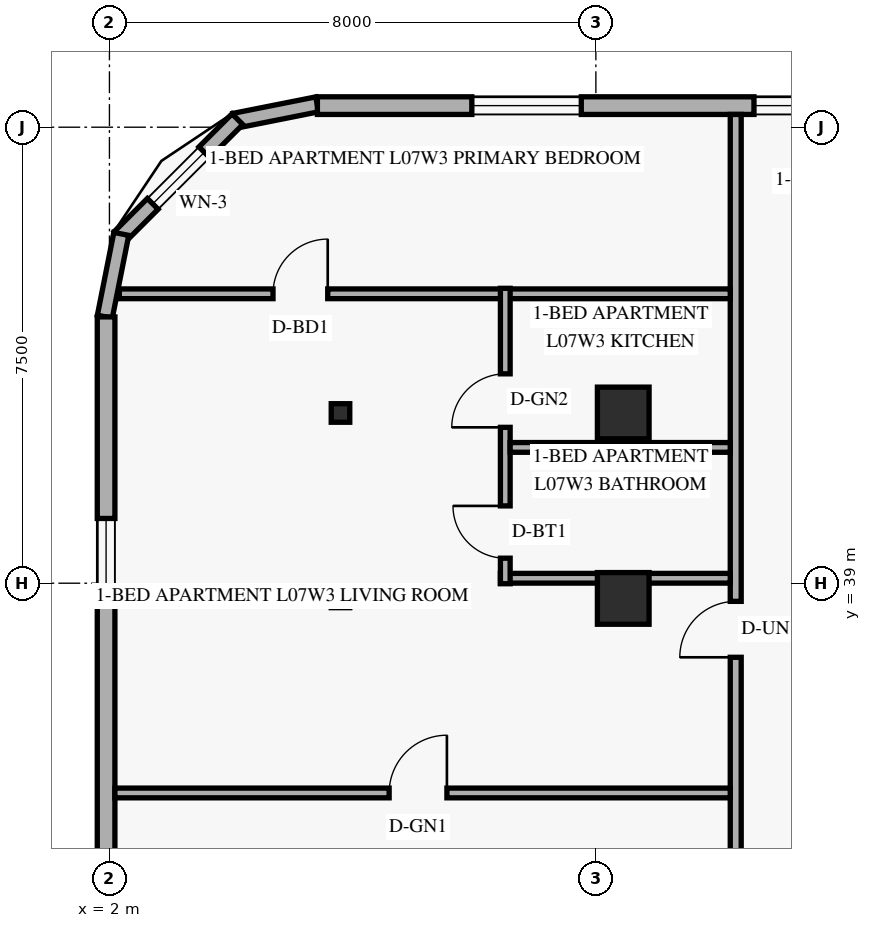
"""IFC4 building model, lengths in metres.
Left out: names, types, materials, properties, quantities, classifications, styles, units other than length and angle.
Written with IfcOpenShell. Run it as: python <this file> out.ifc"""

import sys

from ifc_helpers import new_model, si_unit, direction, frame, frame_2d, origin, origin_2d, place, context, subcontext, project, spatial, rectangle, hollow_rectangle, extrude, element, fill, save


model = new_model("IFC4")
c1 = context("Model", 3, precision=1e-05, world=origin(), true_north=direction((0.0, 1.0)))
c2 = subcontext(c1, "Body", "Model", "MODEL_VIEW")
j1 = project(units=[si_unit("LENGTHUNIT", "METRE"), si_unit("PLANEANGLEUNIT", "RADIAN")], contexts=[c1])
p1 = place(None, origin())
s1 = spatial("IfcSite", under=j1, at=p1, CompositionType="ELEMENT")
p2 = place(p1, origin())
s2 = spatial("IfcBuilding", under=s1, at=p2, CompositionType="ELEMENT")
p3 = place(p2, frame((0.0, 0.0, 31.2)))
s3 = spatial("IfcBuildingStorey", under=s2, at=p3, CompositionType="ELEMENT", Elevation=31.2)
for number, where, z_axis, x_axis in (
    (1, (5.8, 38.75, 0.0), (0.0, 0.0, 1.0), (1.0, 0.0, 0.0)),
    (2, (5.8, 41.8, 0.0), (0.0, 0.0, 1.0), (1.0, 0.0, 0.0)),
):
    element("IfcColumn", number, at=place(p3, frame(where, z_axis=z_axis, x_axis=x_axis)), inside=s3, PredefinedType="COLUMN", context=c2, shape_type="SweptSolid", body=[
        extrude(hollow_rectangle(XDim=0.305, YDim=0.305, WallThickness=0.013, at=origin_2d()), origin(), (0.0, 0.0, 1.0), 3.6),
    ])
for number, where, z_axis, x_axis in (
    (3, (10.45, 38.75, 0.0), (0.0, 0.0, 1.0), (1.0, 0.0, 0.0)),
    (4, (10.45, 41.8, 0.0), (0.0, 0.0, 1.0), (1.0, 0.0, 0.0)),
):
    element("IfcColumn", number, at=place(p3, frame(where, z_axis=z_axis, x_axis=x_axis)), inside=s3, PredefinedType="COLUMN", context=c2, shape_type="SweptSolid", body=[
        extrude(rectangle(XDim=0.85, YDim=0.85, at=origin_2d()), origin(), (0.0, 0.0, 1.0), 3.6),
    ])
p4 = place(p3, frame((5.417, 46.876, 0.0), z_axis=(0.0, 0.0, 1.0), x_axis=(-0.980809899341, -0.19496651342, 0.0)))
e5 = element("IfcWall", 5, at=p4, inside=s3, PredefinedType="SOLIDWALL", context=c2, shape_type="SweptSolid", body=[
    extrude(rectangle(XDim=1.389, YDim=0.25, at=frame_2d((0.694, 0.0))), origin(), (0.0, 0.0, 1.0), 3.36),
])
p5 = place(p3, frame((4.105, 46.632, 0.0), z_axis=(0.0, 0.0, 1.0), x_axis=(-0.707106781187, -0.707106781187, 0.0)))
e6 = element("IfcWall", 6, at=p5, inside=s3, PredefinedType="SOLIDWALL", context=c2, shape_type="SweptSolid", body=[
    extrude(rectangle(XDim=2.739, YDim=0.25, at=frame_2d((1.37, 0.0))), origin(), (0.0, 0.0, 1.0), 3.36),
])
p6 = place(p5, frame((0.77, 0.0, 0.85)))
e7 = element("IfcOpeningElement", 7, at=p6, cuts=e6, PredefinedType="OPENING", context=c2, shape_type="SweptSolid", body=[
    extrude(rectangle(XDim=1.2, YDim=1.5, at=frame_2d((0.6, 0.75))), frame((0.0, 0.135, 0.0), z_axis=(0.0, -1.0, 0.0), x_axis=(1.0, 0.0, 0.0)), (0.0, 0.0, 1.0), 0.27),
])
p7 = place(p3, frame((2.195, 44.746, 0.0), z_axis=(0.0, 0.0, 1.0), x_axis=(-0.19496651342, -0.980809899341, 0.0)))
e8 = element("IfcWall", 8, at=p7, inside=s3, PredefinedType="SOLIDWALL", context=c2, shape_type="SweptSolid", body=[
    extrude(rectangle(XDim=1.389, YDim=0.25, at=frame_2d((0.694, 0.0))), origin(), (0.0, 0.0, 1.0), 3.36),
])
p8 = place(p3, frame((44.98, 46.855, 0.0), z_axis=(0.0, 0.0, 1.0), x_axis=(-1.0, 0.0, 0.0)))
e9 = element("IfcWall", 9, at=p8, inside=s3, PredefinedType="SOLIDWALL", context=c2, shape_type="SweptSolid", body=[
    extrude(rectangle(XDim=39.56, YDim=0.29, at=frame_2d((19.78, 0.0))), origin(), (0.0, 0.0, 1.0), 3.36),
])
p9 = place(p8, frame((35.22, 0.0, 0.85)))
e10 = element("IfcOpeningElement", 10, at=p9, cuts=e9, PredefinedType="OPENING", context=c2, shape_type="SweptSolid", body=[
    extrude(rectangle(XDim=1.8, YDim=1.6, at=frame_2d((0.9, 0.8))), frame((0.0, 0.155, 0.0), z_axis=(0.0, -1.0, 0.0), x_axis=(1.0, 0.0, 0.0)), (0.0, 0.0, 1.0), 0.31),
])
p10 = place(p8, frame((31.18, 0.0, 0.85)))
e11 = element("IfcOpeningElement", 11, at=p10, cuts=e9, PredefinedType="OPENING", context=c2, shape_type="SweptSolid", body=[
    extrude(rectangle(XDim=1.2, YDim=1.5, at=frame_2d((0.6, 0.75))), frame((0.0, 0.155, 0.0), z_axis=(0.0, -1.0, 0.0), x_axis=(1.0, 0.0, 0.0)), (0.0, 0.0, 1.0), 0.31),
])
p11 = place(p8, frame((26.625, 0.0, 0.85)))
e12 = element("IfcOpeningElement", 12, at=p11, cuts=e9, PredefinedType="OPENING", context=c2, shape_type="SweptSolid", body=[
    extrude(rectangle(XDim=1.8, YDim=1.6, at=frame_2d((0.9, 0.8))), frame((0.0, 0.155, 0.0), z_axis=(0.0, -1.0, 0.0), x_axis=(1.0, 0.0, 0.0)), (0.0, 0.0, 1.0), 0.31),
])
p12 = place(p8, frame((21.2, 0.0, 0.85)))
e13 = element("IfcOpeningElement", 13, at=p12, cuts=e9, PredefinedType="OPENING", context=c2, shape_type="SweptSolid", body=[
    extrude(rectangle(XDim=1.8, YDim=1.6, at=frame_2d((0.9, 0.8))), frame((0.0, 0.155, 0.0), z_axis=(0.0, -1.0, 0.0), x_axis=(1.0, 0.0, 0.0)), (0.0, 0.0, 1.0), 0.31),
])
p13 = place(p8, frame((15.965, 0.0, 0.85)))
e14 = element("IfcOpeningElement", 14, at=p13, cuts=e9, PredefinedType="OPENING", context=c2, shape_type="SweptSolid", body=[
    extrude(rectangle(XDim=1.8, YDim=1.6, at=frame_2d((0.9, 0.8))), frame((0.0, 0.155, 0.0), z_axis=(0.0, -1.0, 0.0), x_axis=(1.0, 0.0, 0.0)), (0.0, 0.0, 1.0), 0.31),
])
p14 = place(p8, frame((10.73, 0.0, 0.85)))
e15 = element("IfcOpeningElement", 15, at=p14, cuts=e9, PredefinedType="OPENING", context=c2, shape_type="SweptSolid", body=[
    extrude(rectangle(XDim=1.8, YDim=1.6, at=frame_2d((0.9, 0.8))), frame((0.0, 0.155, 0.0), z_axis=(0.0, -1.0, 0.0), x_axis=(1.0, 0.0, 0.0)), (0.0, 0.0, 1.0), 0.31),
])
p15 = place(p8, frame((7.895, 0.0, 0.85)))
e16 = element("IfcOpeningElement", 16, at=p15, cuts=e9, PredefinedType="OPENING", context=c2, shape_type="SweptSolid", body=[
    extrude(rectangle(XDim=1.2, YDim=1.5, at=frame_2d((0.6, 0.75))), frame((0.0, 0.155, 0.0), z_axis=(0.0, -1.0, 0.0), x_axis=(1.0, 0.0, 0.0)), (0.0, 0.0, 1.0), 0.31),
])
p16 = place(p8, frame((2.815, 0.0, 0.85)))
e17 = element("IfcOpeningElement", 17, at=p16, cuts=e9, PredefinedType="OPENING", context=c2, shape_type="SweptSolid", body=[
    extrude(rectangle(XDim=1.8, YDim=1.6, at=frame_2d((0.9, 0.8))), frame((0.0, 0.155, 0.0), z_axis=(0.0, -1.0, 0.0), x_axis=(1.0, 0.0, 0.0)), (0.0, 0.0, 1.0), 0.31),
])
p17 = place(p3, frame((1.945, 43.38, 0.0), z_axis=(0.0, 0.0, 1.0), x_axis=(0.0, -1.0, 0.0)))
e18 = element("IfcWall", 18, at=p17, inside=s3, PredefinedType="SOLIDWALL", context=c2, shape_type="SweptSolid", body=[
    extrude(rectangle(XDim=38.76, YDim=0.29, at=frame_2d((19.38, 0.0))), origin(), (0.0, 0.0, 1.0), 3.36),
])
p18 = place(p17, frame((32.15, 0.0, 0.85)))
e19 = element("IfcOpeningElement", 19, at=p18, cuts=e18, PredefinedType="OPENING", context=c2, shape_type="SweptSolid", body=[
    extrude(rectangle(XDim=1.2, YDim=1.5, at=frame_2d((0.6, 0.75))), frame((0.0, 0.155, 0.0), z_axis=(0.0, -1.0, 0.0), x_axis=(1.0, 0.0, 0.0)), (0.0, 0.0, 1.0), 0.31),
])
p19 = place(p17, frame((24.138, 0.0, 0.85)))
e20 = element("IfcOpeningElement", 20, at=p19, cuts=e18, PredefinedType="OPENING", context=c2, shape_type="SweptSolid", body=[
    extrude(rectangle(XDim=1.2, YDim=1.5, at=frame_2d((0.6, 0.75))), frame((0.0, 0.155, 0.0), z_axis=(0.0, -1.0, 0.0), x_axis=(1.0, 0.0, 0.0)), (0.0, 0.0, 1.0), 0.31),
])
p20 = place(p17, frame((18.313, 0.0, 0.85)))
e21 = element("IfcOpeningElement", 21, at=p20, cuts=e18, PredefinedType="OPENING", context=c2, shape_type="SweptSolid", body=[
    extrude(rectangle(XDim=1.2, YDim=1.5, at=frame_2d((0.6, 0.75))), frame((0.0, 0.155, 0.0), z_axis=(0.0, -1.0, 0.0), x_axis=(1.0, 0.0, 0.0)), (0.0, 0.0, 1.0), 0.31),
])
p21 = place(p17, frame((12.495, 0.0, 0.85)))
e22 = element("IfcOpeningElement", 22, at=p21, cuts=e18, PredefinedType="OPENING", context=c2, shape_type="SweptSolid", body=[
    extrude(rectangle(XDim=1.2, YDim=1.5, at=frame_2d((0.6, 0.75))), frame((0.0, 0.155, 0.0), z_axis=(0.0, -1.0, 0.0), x_axis=(1.0, 0.0, 0.0)), (0.0, 0.0, 1.0), 0.31),
])
p22 = place(p17, frame((8.865, 0.0, 0.85)))
e23 = element("IfcOpeningElement", 23, at=p22, cuts=e18, PredefinedType="OPENING", context=c2, shape_type="SweptSolid", body=[
    extrude(rectangle(XDim=1.2, YDim=1.5, at=frame_2d((0.6, 0.75))), frame((0.0, 0.155, 0.0), z_axis=(0.0, -1.0, 0.0), x_axis=(1.0, 0.0, 0.0)), (0.0, 0.0, 1.0), 0.31),
])
p23 = place(p17, frame((3.315, 0.0, 0.85)))
e24 = element("IfcOpeningElement", 24, at=p23, cuts=e18, PredefinedType="OPENING", context=c2, shape_type="SweptSolid", body=[
    extrude(rectangle(XDim=1.2, YDim=1.5, at=frame_2d((0.6, 0.75))), frame((0.0, 0.155, 0.0), z_axis=(0.0, -1.0, 0.0), x_axis=(1.0, 0.0, 0.0)), (0.0, 0.0, 1.0), 0.31),
])
p24 = place(p3, frame((12.3, 1.29, 0.0), z_axis=(0.0, 0.0, 1.0), x_axis=(0.0, 1.0, 0.0)))
e25 = element("IfcWall", 25, at=p24, inside=s3, PredefinedType="STANDARD", context=c2, shape_type="SweptSolid", body=[
    extrude(rectangle(XDim=45.42, YDim=0.18, at=frame_2d((22.71, 0.0))), origin(), (0.0, 0.0, 1.0), 2.649),
])
p25 = place(p24, frame((9.41, 0.0, 0.0)))
e26 = element("IfcOpeningElement", 26, at=p25, cuts=e25, PredefinedType="OPENING", context=c2, shape_type="SweptSolid", body=[
    extrude(rectangle(XDim=0.92, YDim=2.15, at=frame_2d((0.46, 1.075))), frame((0.0, 0.1, 0.0), z_axis=(0.0, -1.0, 0.0), x_axis=(1.0, 0.0, 0.0)), (0.0, 0.0, 1.0), 0.2),
])
p26 = place(p24, frame((21.05, 0.0, 0.0)))
e27 = element("IfcOpeningElement", 27, at=p26, cuts=e25, PredefinedType="OPENING", context=c2, shape_type="SweptSolid", body=[
    extrude(rectangle(XDim=0.92, YDim=2.15, at=frame_2d((0.46, 1.075))), frame((0.0, 0.1, 0.0), z_axis=(0.0, -1.0, 0.0), x_axis=(1.0, 0.0, 0.0)), (0.0, 0.0, 1.0), 0.2),
])
p27 = place(p24, frame((36.491, 0.0, 0.0)))
e28 = element("IfcOpeningElement", 28, at=p27, cuts=e25, PredefinedType="OPENING", context=c2, shape_type="SweptSolid", body=[
    extrude(rectangle(XDim=0.92, YDim=2.15, at=frame_2d((0.46, 1.075))), frame((0.0, 0.1, 0.0), z_axis=(0.0, -1.0, 0.0), x_axis=(1.0, 0.0, 0.0)), (0.0, 0.0, 1.0), 0.2),
])
p28 = place(p3, frame((2.162, 43.76, 0.0), z_axis=(0.0, 0.0, 1.0), x_axis=(1.0, 0.0, 0.0)))
e29 = element("IfcWall", 29, at=p28, inside=s3, PredefinedType="PARTITIONING", context=c2, shape_type="SweptSolid", body=[
    extrude(rectangle(XDim=10.048, YDim=0.16, at=frame_2d((5.024, 0.0))), origin(), (0.0, 0.0, 1.0), 3.36),
])
p29 = place(p28, frame((2.528, 0.0, 0.0)))
e30 = element("IfcOpeningElement", 30, at=p29, cuts=e29, PredefinedType="OPENING", context=c2, shape_type="SweptSolid", body=[
    extrude(rectangle(XDim=0.9, YDim=2.14, at=frame_2d((0.45, 1.07))), frame((0.0, 0.09, 0.0), z_axis=(0.0, -1.0, 0.0), x_axis=(1.0, 0.0, 0.0)), (0.0, 0.0, 1.0), 0.18),
])
p30 = place(p3, frame((8.43, 39.082, 0.0), z_axis=(0.0, 0.0, 1.0), x_axis=(1.0, 0.0, 0.0)))
e31 = element("IfcWall", 31, at=p30, inside=s3, PredefinedType="PLUMBINGWALL", context=c2, shape_type="SweptSolid", body=[
    extrude(rectangle(XDim=3.78, YDim=0.16, at=frame_2d((1.89, 0.0))), origin(), (0.0, 0.0, 1.0), 3.36),
])
p31 = place(p3, frame((8.51, 38.991, 0.0), z_axis=(0.0, 0.0, 1.0), x_axis=(0.0, 1.0, 0.0)))
e32 = element("IfcWall", 32, at=p31, inside=s3, PredefinedType="PLUMBINGWALL", context=c2, shape_type="SweptSolid", body=[
    extrude(rectangle(XDim=4.859, YDim=0.16, at=frame_2d((2.429, 0.0))), origin(), (0.0, 0.0, 1.0), 2.809),
])
p32 = place(p31, frame((0.42, 0.0, 0.0)))
e33 = element("IfcOpeningElement", 33, at=p32, cuts=e32, PredefinedType="OPENING", context=c2, shape_type="SweptSolid", body=[
    extrude(rectangle(XDim=0.86, YDim=2.12, at=frame_2d((0.43, 1.06))), frame((0.0, 0.09, 0.0), z_axis=(0.0, -1.0, 0.0), x_axis=(1.0, 0.0, 0.0)), (0.0, 0.0, 1.0), 0.18),
])
p33 = place(p31, frame((2.572, 0.0, 0.0)))
e34 = element("IfcOpeningElement", 34, at=p33, cuts=e32, PredefinedType="OPENING", context=c2, shape_type="SweptSolid", body=[
    extrude(rectangle(XDim=0.88, YDim=2.12, at=frame_2d((0.44, 1.06))), frame((0.0, 0.09, 0.0), z_axis=(0.0, -1.0, 0.0), x_axis=(1.0, 0.0, 0.0)), (0.0, 0.0, 1.0), 0.18),
])
p34 = place(p3, frame((8.59, 41.234, 0.0), z_axis=(0.0, 0.0, 1.0), x_axis=(1.0, 0.0, 0.0)))
e35 = element("IfcWall", 35, at=p34, inside=s3, PredefinedType="PLUMBINGWALL", context=c2, shape_type="SweptSolid", body=[
    extrude(rectangle(XDim=3.62, YDim=0.16, at=frame_2d((1.81, 0.0))), origin(), (0.0, 0.0, 1.0), 2.649),
])
p35 = place(p3, frame((2.09, 35.55, 0.0), z_axis=(0.0, 0.0, 1.0), x_axis=(1.0, 0.0, 0.0)))
e36 = element("IfcWall", 36, at=p35, inside=s3, PredefinedType="PARTITIONING", context=c2, shape_type="SweptSolid", body=[
    extrude(rectangle(XDim=10.12, YDim=0.16, at=frame_2d((5.06, 0.0))), origin(), (0.0, 0.0, 1.0), 2.649),
])
p36 = place(p35, frame((4.51, 0.0, 0.0)))
e37 = element("IfcOpeningElement", 37, at=p36, cuts=e36, PredefinedType="OPENING", context=c2, shape_type="SweptSolid", body=[
    extrude(rectangle(XDim=0.95, YDim=2.15, at=frame_2d((0.475, 1.075))), frame((0.0, 0.09, 0.0), z_axis=(0.0, -1.0, 0.0), x_axis=(1.0, 0.0, 0.0)), (0.0, 0.0, 1.0), 0.18),
])
p37 = place(p6, origin())
e38 = element("IfcWindow", 38, at=p37, inside=s3, PartitioningType="SINGLE_PANEL", PredefinedType="WINDOW", context=c2, shape_type="SweptSolid", body=[
    extrude(rectangle(XDim=1.2, YDim=1.5, at=frame_2d((0.6, 0.75))), frame((0.0, 0.03, 0.0), z_axis=(0.0, -1.0, 0.0), x_axis=(1.0, 0.0, 0.0)), (0.0, 0.0, 1.0), 0.06),
])
fill(e7, e38)
p38 = place(p9, origin())
e39 = element("IfcWindow", 39, at=p38, inside=s3, PartitioningType="SINGLE_PANEL", PredefinedType="WINDOW", context=c2, shape_type="SweptSolid", body=[
    extrude(rectangle(XDim=1.8, YDim=1.6, at=frame_2d((0.9, 0.8))), frame((0.0, 0.03, 0.0), z_axis=(0.0, -1.0, 0.0), x_axis=(1.0, 0.0, 0.0)), (0.0, 0.0, 1.0), 0.06),
])
fill(e10, e39)
p39 = place(p10, origin())
e40 = element("IfcWindow", 40, at=p39, inside=s3, PartitioningType="SINGLE_PANEL", PredefinedType="WINDOW", context=c2, shape_type="SweptSolid", body=[
    extrude(rectangle(XDim=1.2, YDim=1.5, at=frame_2d((0.6, 0.75))), frame((0.0, 0.03, 0.0), z_axis=(0.0, -1.0, 0.0), x_axis=(1.0, 0.0, 0.0)), (0.0, 0.0, 1.0), 0.06),
])
fill(e11, e40)
p40 = place(p23, origin())
e41 = element("IfcWindow", 41, at=p40, inside=s3, PartitioningType="SINGLE_PANEL", PredefinedType="WINDOW", context=c2, shape_type="SweptSolid", body=[
    extrude(rectangle(XDim=1.2, YDim=1.5, at=frame_2d((0.6, 0.75))), frame((0.0, 0.03, 0.0), z_axis=(0.0, -1.0, 0.0), x_axis=(1.0, 0.0, 0.0)), (0.0, 0.0, 1.0), 0.06),
])
fill(e24, e41)
p41 = place(p36, origin())
e42 = element("IfcDoor", 42, at=p41, inside=s3, OperationType="SINGLE_SWING_RIGHT", PredefinedType="DOOR", context=c2, shape_type="SweptSolid", body=[
    extrude(rectangle(XDim=0.95, YDim=2.15, at=frame_2d((0.475, 1.075))), frame((0.0, 0.025, 0.0), z_axis=(0.0, -1.0, 0.0), x_axis=(1.0, 0.0, 0.0)), (0.0, 0.0, 1.0), 0.05),
])
fill(e37, e42)
p42 = place(p27, origin())
e43 = element("IfcDoor", 43, at=p42, inside=s3, OperationType="SINGLE_SWING_LEFT", PredefinedType="DOOR", context=c2, shape_type="SweptSolid", body=[
    extrude(rectangle(XDim=0.92, YDim=2.15, at=frame_2d((0.46, 1.075))), frame((0.0, 0.025, 0.0), z_axis=(0.0, -1.0, 0.0), x_axis=(1.0, 0.0, 0.0)), (0.0, 0.0, 1.0), 0.05),
])
fill(e28, e43)
p43 = place(p32, origin())
e44 = element("IfcDoor", 44, at=p43, inside=s3, OperationType="SINGLE_SWING_RIGHT", PredefinedType="DOOR", context=c2, shape_type="SweptSolid", body=[
    extrude(rectangle(XDim=0.86, YDim=2.12, at=frame_2d((0.43, 1.06))), frame((0.0, 0.025, 0.0), z_axis=(0.0, -1.0, 0.0), x_axis=(1.0, 0.0, 0.0)), (0.0, 0.0, 1.0), 0.05),
])
fill(e33, e44)
p44 = place(p33, origin())
e45 = element("IfcDoor", 45, at=p44, inside=s3, OperationType="SINGLE_SWING_LEFT", PredefinedType="DOOR", context=c2, shape_type="SweptSolid", body=[
    extrude(rectangle(XDim=0.88, YDim=2.12, at=frame_2d((0.44, 1.06))), frame((0.0, 0.025, 0.0), z_axis=(0.0, -1.0, 0.0), x_axis=(1.0, 0.0, 0.0)), (0.0, 0.0, 1.0), 0.05),
])
fill(e34, e45)
p45 = place(p29, origin())
e46 = element("IfcDoor", 46, at=p45, inside=s3, OperationType="SINGLE_SWING_RIGHT", PredefinedType="DOOR", context=c2, shape_type="SweptSolid", body=[
    extrude(rectangle(XDim=0.9, YDim=2.14, at=frame_2d((0.45, 1.07))), frame((0.0, 0.025, 0.0), z_axis=(0.0, -1.0, 0.0), x_axis=(1.0, 0.0, 0.0)), (0.0, 0.0, 1.0), 0.05),
])
fill(e30, e46)
save(model, sys.argv[1])
